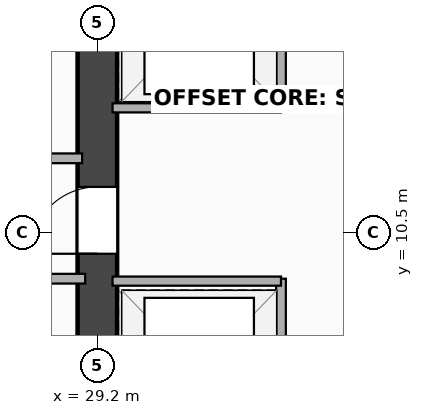
"""IFC4 building model, lengths in metres.
Left out: names, types, materials, properties, quantities, classifications, styles, units other than length and angle.
Written with IfcOpenShell. Run it as: python <this file> out.ifc"""

import sys

from ifc_helpers import new_model, si_unit, direction, frame, frame_2d, origin, place, context, subcontext, project, spatial, rectangle, extrude, element, fill, save


model = new_model("IFC4")
c1 = context("Model", 3, precision=1e-05, world=origin(), true_north=direction((0.0, 1.0)))
c2 = subcontext(c1, "Body", "Model", "MODEL_VIEW")
j1 = project(units=[si_unit("LENGTHUNIT", "METRE"), si_unit("PLANEANGLEUNIT", "RADIAN")], contexts=[c1])
p1 = place(None, origin())
s1 = spatial("IfcSite", under=j1, at=p1, CompositionType="ELEMENT")
p2 = place(p1, origin())
s2 = spatial("IfcBuilding", under=s1, at=p2, CompositionType="ELEMENT")
p3 = place(p2, frame((0.0, 0.0, 71.9)))
s3 = spatial("IfcBuildingStorey", under=s2, at=p3, CompositionType="ELEMENT", Elevation=71.9)
p4 = place(p3, frame((29.2, 3.5, 0.0), z_axis=(0.0, 0.0, 1.0), x_axis=(0.0, 1.0, 0.0)))
e1 = element("IfcWall", 1, at=p4, inside=s3, PredefinedType="SHEAR", context=c2, shape_type="SweptSolid", body=[
    extrude(rectangle(XDim=16.9, YDim=0.65, at=frame_2d((8.45, 0.0))), origin(), (0.0, 0.0, 1.0), 3.18),
])
p5 = place(p4, frame((7.75, 0.0, 0.0), z_axis=(0.0, 0.0, 1.0), x_axis=(-1.0, 0.0, 0.0)))
e2 = element("IfcOpeningElement", 2, at=p5, cuts=e1, PredefinedType="OPENING", context=c2, shape_type="SweptSolid", body=[
    extrude(rectangle(XDim=1.1, YDim=2.15, at=frame_2d((0.55, 1.075))), frame((0.0, 0.335, 0.0), z_axis=(0.0, -1.0, 0.0), x_axis=(1.0, 0.0, 0.0)), (0.0, 0.0, 1.0), 0.67),
])
p6 = place(p3, frame((26.49, 11.72, 0.0), z_axis=(0.0, 0.0, 1.0), x_axis=(1.0, 0.0, 0.0)))
e3 = element("IfcWall", 3, at=p6, inside=s3, PredefinedType="PARTITIONING", context=c2, shape_type="SweptSolid", body=[
    extrude(rectangle(XDim=2.459, YDim=0.16, at=frame_2d((1.23, 0.0))), origin(), (0.0, 0.0, 1.0), 3.18),
])
p7 = place(p6, frame((0.77, 0.0, 0.0)))
e4 = element("IfcOpeningElement", 4, at=p7, cuts=e3, PredefinedType="OPENING", context=c2, shape_type="SweptSolid", body=[
    extrude(rectangle(XDim=0.92, YDim=2.08, at=frame_2d((0.46, 1.04))), frame((0.0, 0.09, 0.0), z_axis=(0.0, -1.0, 0.0), x_axis=(1.0, 0.0, 0.0)), (0.0, 0.0, 1.0), 0.18),
])
p8 = place(p3, frame((24.2, 9.74, 0.0), z_axis=(0.0, 0.0, 1.0), x_axis=(1.0, 0.0, 0.0)))
e5 = element("IfcWall", 5, at=p8, inside=s3, PredefinedType="PARTITIONING", context=c2, shape_type="SweptSolid", body=[
    extrude(rectangle(XDim=4.8, YDim=0.16, at=frame_2d((2.4, 0.0))), origin(), (0.0, 0.0, 1.0), 3.18),
])
p9 = place(p8, frame((1.85, 0.0, 0.0)))
e6 = element("IfcOpeningElement", 6, at=p9, cuts=e5, PredefinedType="OPENING", context=c2, shape_type="SweptSolid", body=[
    extrude(rectangle(XDim=1.1, YDim=2.15, at=frame_2d((0.55, 1.075))), frame((0.0, 0.09, 0.0), z_axis=(0.0, -1.0, 0.0), x_axis=(1.0, 0.0, 0.0)), (0.0, 0.0, 1.0), 0.18),
])
p10 = place(p3, frame((32.22, 3.9, 0.0), z_axis=(0.0, 0.0, 1.0), x_axis=(0.0, 1.0, 0.0)))
e7 = element("IfcWall", 7, at=p10, inside=s3, PredefinedType="PARTITIONING", context=c2, shape_type="SweptSolid", body=[
    extrude(rectangle(XDim=5.84, YDim=0.16, at=frame_2d((2.92, 0.0))), origin(), (0.0, 0.0, 1.0), 3.18),
])
p11 = place(p10, frame((1.78, 0.0, 0.0), z_axis=(0.0, 0.0, 1.0), x_axis=(-1.0, 0.0, 0.0)))
e8 = element("IfcOpeningElement", 8, at=p11, cuts=e7, PredefinedType="OPENING", context=c2, shape_type="SweptSolid", body=[
    extrude(rectangle(XDim=1.08, YDim=2.16, at=frame_2d((0.54, 1.08))), frame((0.0, 0.09, 0.0), z_axis=(0.0, -1.0, 0.0), x_axis=(1.0, 0.0, 0.0)), (0.0, 0.0, 1.0), 0.18),
])
p12 = place(p10, frame((4.68, 0.0, 0.0), z_axis=(0.0, 0.0, 1.0), x_axis=(-1.0, 0.0, 0.0)))
e9 = element("IfcOpeningElement", 9, at=p12, cuts=e7, PredefinedType="OPENING", context=c2, shape_type="SweptSolid", body=[
    extrude(rectangle(XDim=1.08, YDim=2.16, at=frame_2d((0.54, 1.08))), frame((0.0, 0.09, 0.0), z_axis=(0.0, -1.0, 0.0), x_axis=(1.0, 0.0, 0.0)), (0.0, 0.0, 1.0), 0.18),
])
p13 = place(p3, frame((29.45, 9.7, 0.0), z_axis=(0.0, 0.0, 1.0), x_axis=(1.0, 0.0, 0.0)))
e10 = element("IfcWall", 10, at=p13, inside=s3, PredefinedType="PARTITIONING", context=c2, shape_type="SweptSolid", body=[
    extrude(rectangle(XDim=2.77, YDim=0.15, at=frame_2d((1.385, 0.0))), origin(), (0.0, 0.0, 1.0), 3.18),
])
p14 = place(p3, frame((32.22, 12.5, 0.0), z_axis=(0.0, 0.0, 1.0), x_axis=(0.0, 1.0, 0.0)))
e11 = element("IfcWall", 11, at=p14, inside=s3, PredefinedType="PARTITIONING", context=c2, shape_type="SweptSolid", body=[
    extrude(rectangle(XDim=7.92, YDim=0.16, at=frame_2d((3.96, 0.0))), origin(), (0.0, 0.0, 1.0), 2.47),
])
p15 = place(p14, frame((6.1, 0.0, 0.0)))
e12 = element("IfcOpeningElement", 12, at=p15, cuts=e11, PredefinedType="OPENING", context=c2, shape_type="SweptSolid", body=[
    extrude(rectangle(XDim=0.88, YDim=2.08, at=frame_2d((0.44, 1.04))), frame((0.0, 0.09, 0.0), z_axis=(0.0, -1.0, 0.0), x_axis=(1.0, 0.0, 0.0)), (0.0, 0.0, 1.0), 0.18),
])
p16 = place(p3, frame((29.45, 12.55, 0.0), z_axis=(0.0, 0.0, 1.0), x_axis=(1.0, 0.0, 0.0)))
e13 = element("IfcWall", 13, at=p16, inside=s3, PredefinedType="PARTITIONING", context=c2, shape_type="SweptSolid", body=[
    extrude(rectangle(XDim=2.77, YDim=0.15, at=frame_2d((1.385, 0.0))), origin(), (0.0, 0.0, 1.0), 3.18),
])
p17 = place(p5, origin())
e14 = element("IfcDoor", 14, at=p17, inside=s3, OperationType="SINGLE_SWING_LEFT", PredefinedType="DOOR", context=c2, shape_type="SweptSolid", body=[
    extrude(rectangle(XDim=1.1, YDim=2.15, at=frame_2d((0.55, 1.075))), frame((0.0, 0.025, 0.0), z_axis=(0.0, -1.0, 0.0), x_axis=(1.0, 0.0, 0.0)), (0.0, 0.0, 1.0), 0.05),
])
fill(e2, e14)
save(model, sys.argv[1])
